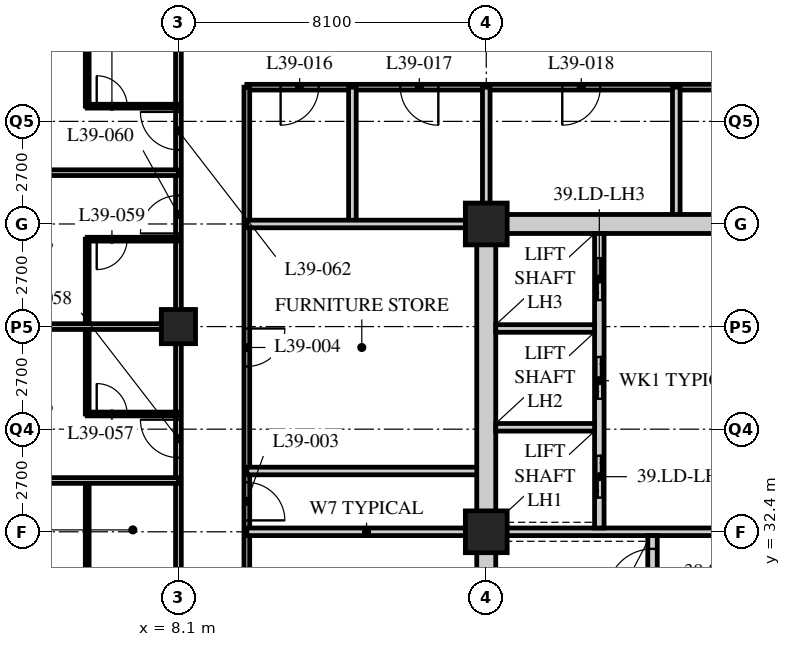
"""IFC4 building model, lengths in metres.
Left out: names, types, materials, properties, quantities, classifications, styles, units other than length and angle.
Written with IfcOpenShell. Run it as: python <this file> out.ifc"""

import sys

from ifc_helpers import new_model, si_unit, direction, frame, frame_2d, origin, origin_2d, place, context, subcontext, project, spatial, rectangle, hollow_rectangle, extrude, element, fill, save


model = new_model("IFC4")
c1 = context("Model", 3, precision=1e-05, world=origin(), true_north=direction((0.0, 1.0)))
c2 = subcontext(c1, "Body", "Model", "MODEL_VIEW")
j1 = project(units=[si_unit("LENGTHUNIT", "METRE"), si_unit("PLANEANGLEUNIT", "RADIAN")], contexts=[c1])
p1 = place(None, origin())
s1 = spatial("IfcSite", under=j1, at=p1, CompositionType="ELEMENT")
p2 = place(p1, origin())
s2 = spatial("IfcBuilding", under=s1, at=p2, CompositionType="ELEMENT")
p3 = place(p2, frame((0.0, 0.0, 151.0)))
s3 = spatial("IfcBuildingStorey", under=s2, at=p3, CompositionType="ELEMENT", Elevation=151.0)
p4 = place(p3, frame((8.1, 37.8, 0.0), z_axis=(0.0, 0.0, 1.0), x_axis=(1.0, 0.0, 0.0)))
e1 = element("IfcColumn", 1, at=p4, inside=s3, PredefinedType="COLUMN", context=c2, shape_type="SweptSolid", body=[
    extrude(hollow_rectangle(XDim=0.9, YDim=0.9, WallThickness=0.1, at=origin_2d()), origin(), (0.0, 0.0, 1.0), 3.4),
])
for number, where, z_axis, x_axis in (
    (2, (16.2, 32.4, 0.0), (0.0, 0.0, 1.0), (1.0, 0.0, 0.0)),
    (3, (16.2, 40.5, 0.0), (0.0, 0.0, 1.0), (1.0, 0.0, 0.0)),
):
    element("IfcColumn", number, at=place(p3, frame(where, z_axis=z_axis, x_axis=x_axis)), inside=s3, PredefinedType="COLUMN", context=c2, shape_type="SweptSolid", body=[
        extrude(hollow_rectangle(XDim=1.1, YDim=1.1, WallThickness=0.1, at=origin_2d()), origin(), (0.0, 0.0, 1.0), 3.4),
    ])
p5 = place(p3, frame((8.1, 17.55, 0.0), z_axis=(0.0, 0.0, 1.0), x_axis=(0.0, 1.0, 0.0)))
e4 = element("IfcWall", 4, at=p5, inside=s3, PredefinedType="PARTITIONING", context=c2, shape_type="SweptSolid", body=[
    extrude(rectangle(XDim=28.35, YDim=0.15, at=frame_2d((14.175, 0.0))), origin(), (0.0, 0.0, 1.0), 2.42),
])
p6 = place(p5, frame((5.95, 0.0, 0.0)))
e5 = element("IfcOpeningElement", 5, at=p6, cuts=e4, PredefinedType="OPENING", context=c2, shape_type="SweptSolid", body=[
    extrude(rectangle(XDim=1.0, YDim=2.1, at=frame_2d((0.5, 1.05))), frame((0.0, 0.085, 0.0), z_axis=(0.0, -1.0, 0.0), x_axis=(1.0, 0.0, 0.0)), (0.0, 0.0, 1.0), 0.17),
])
p7 = place(p5, frame((16.8, 0.0, 0.0)))
e6 = element("IfcOpeningElement", 6, at=p7, cuts=e4, PredefinedType="OPENING", context=c2, shape_type="SweptSolid", body=[
    extrude(rectangle(XDim=1.0, YDim=2.1, at=frame_2d((0.5, 1.05))), frame((0.0, 0.085, 0.0), z_axis=(0.0, -1.0, 0.0), x_axis=(1.0, 0.0, 0.0)), (0.0, 0.0, 1.0), 0.17),
])
p8 = place(p5, frame((22.7, 0.0, 0.0)))
e7 = element("IfcOpeningElement", 7, at=p8, cuts=e4, PredefinedType="OPENING", context=c2, shape_type="SweptSolid", body=[
    extrude(rectangle(XDim=1.0, YDim=2.1, at=frame_2d((0.5, 1.05))), frame((0.0, 0.085, 0.0), z_axis=(0.0, -1.0, 0.0), x_axis=(1.0, 0.0, 0.0)), (0.0, 0.0, 1.0), 0.17),
])
p9 = place(p5, frame((24.9, 0.0, 0.0)))
e8 = element("IfcOpeningElement", 8, at=p9, cuts=e4, PredefinedType="OPENING", context=c2, shape_type="SweptSolid", body=[
    extrude(rectangle(XDim=1.0, YDim=2.1, at=frame_2d((0.5, 1.05))), frame((0.0, 0.085, 0.0), z_axis=(0.0, -1.0, 0.0), x_axis=(1.0, 0.0, 0.0)), (0.0, 0.0, 1.0), 0.17),
])
p10 = place(p3, frame((27.14, 44.1, 0.0), z_axis=(0.0, 0.0, 1.0), x_axis=(-1.0, 0.0, 0.0)))
e9 = element("IfcWall", 9, at=p10, inside=s3, PredefinedType="PARTITIONING", context=c2, shape_type="SweptSolid", body=[
    extrude(rectangle(XDim=17.24, YDim=0.15, at=frame_2d((8.62, 0.0))), origin(), (0.0, 0.0, 1.0), 3.19),
])
p11 = place(p10, frame((15.351, 0.0, 0.0)))
e10 = element("IfcOpeningElement", 10, at=p11, cuts=e9, PredefinedType="OPENING", context=c2, shape_type="SweptSolid", body=[
    extrude(rectangle(XDim=1.0, YDim=2.1, at=frame_2d((0.5, 1.05))), frame((0.0, 0.085, 0.0), z_axis=(0.0, -1.0, 0.0), x_axis=(1.0, 0.0, 0.0)), (0.0, 0.0, 1.0), 0.17),
])
p12 = place(p10, frame((12.201, 0.0, 0.0)))
e11 = element("IfcOpeningElement", 11, at=p12, cuts=e9, PredefinedType="OPENING", context=c2, shape_type="SweptSolid", body=[
    extrude(rectangle(XDim=1.0, YDim=2.1, at=frame_2d((0.5, 1.05))), frame((0.0, 0.085, 0.0), z_axis=(0.0, -1.0, 0.0), x_axis=(1.0, 0.0, 0.0)), (0.0, 0.0, 1.0), 0.17),
])
p13 = place(p10, frame((7.94, 0.0, 0.0)))
e12 = element("IfcOpeningElement", 12, at=p13, cuts=e9, PredefinedType="OPENING", context=c2, shape_type="SweptSolid", body=[
    extrude(rectangle(XDim=1.0, YDim=2.1, at=frame_2d((0.5, 1.05))), frame((0.0, 0.085, 0.0), z_axis=(0.0, -1.0, 0.0), x_axis=(1.0, 0.0, 0.0)), (0.0, 0.0, 1.0), 0.17),
])
p14 = place(p10, frame((2.465, 0.0, 0.0)))
e13 = element("IfcOpeningElement", 13, at=p14, cuts=e9, PredefinedType="OPENING", context=c2, shape_type="SweptSolid", body=[
    extrude(rectangle(XDim=1.0, YDim=2.1, at=frame_2d((0.5, 1.05))), frame((0.0, 0.085, 0.0), z_axis=(0.0, -1.0, 0.0), x_axis=(1.0, 0.0, 0.0)), (0.0, 0.0, 1.0), 0.17),
])
p15 = place(p3, frame((9.9, 44.1, 0.0), z_axis=(0.0, 0.0, 1.0), x_axis=(0.0, -1.0, 0.0)))
e14 = element("IfcWall", 14, at=p15, inside=s3, PredefinedType="PARTITIONING", context=c2, shape_type="SweptSolid", body=[
    extrude(rectangle(XDim=24.75, YDim=0.15, at=frame_2d((12.375, 0.0))), origin(), (0.0, 0.0, 1.0), 3.19),
])
p16 = place(p15, frame((17.871, 0.0, 0.0)))
e15 = element("IfcOpeningElement", 15, at=p16, cuts=e14, PredefinedType="OPENING", context=c2, shape_type="SweptSolid", body=[
    extrude(rectangle(XDim=1.0, YDim=2.1, at=frame_2d((0.5, 1.05))), frame((0.0, 0.085, 0.0), z_axis=(0.0, -1.0, 0.0), x_axis=(1.0, 0.0, 0.0)), (0.0, 0.0, 1.0), 0.17),
])
p17 = place(p15, frame((13.821, 0.0, 0.0)))
e16 = element("IfcOpeningElement", 16, at=p17, cuts=e14, PredefinedType="OPENING", context=c2, shape_type="SweptSolid", body=[
    extrude(rectangle(XDim=1.0, YDim=2.1, at=frame_2d((0.5, 1.05))), frame((0.0, 0.085, 0.0), z_axis=(0.0, -1.0, 0.0), x_axis=(1.0, 0.0, 0.0)), (0.0, 0.0, 1.0), 0.17),
])
p18 = place(p15, frame((10.4, 0.0, 0.0)))
e17 = element("IfcOpeningElement", 17, at=p18, cuts=e14, PredefinedType="OPENING", context=c2, shape_type="SweptSolid", body=[
    extrude(rectangle(XDim=1.0, YDim=2.1, at=frame_2d((0.5, 1.05))), frame((0.0, 0.085, 0.0), z_axis=(0.0, -1.0, 0.0), x_axis=(1.0, 0.0, 0.0)), (0.0, 0.0, 1.0), 0.17),
])
p19 = place(p15, frame((6.35, 0.0, 0.0)))
e18 = element("IfcOpeningElement", 18, at=p19, cuts=e14, PredefinedType="OPENING", context=c2, shape_type="SweptSolid", body=[
    extrude(rectangle(XDim=1.0, YDim=2.1, at=frame_2d((0.5, 1.05))), frame((0.0, 0.085, 0.0), z_axis=(0.0, -1.0, 0.0), x_axis=(1.0, 0.0, 0.0)), (0.0, 0.0, 1.0), 0.17),
])
for number, where, z_axis, x_axis in (
    (19, (9.9, 32.4, 0.0), (0.0, 0.0, 1.0), (1.0, 0.0, 0.0)),
    (20, (9.9, 34.0, 0.0), (0.0, 0.0, 1.0), (1.0, 0.0, 0.0)),
):
    element("IfcWall", number, at=place(p3, frame(where, z_axis=z_axis, x_axis=x_axis)), inside=s3, PredefinedType="SOLIDWALL", context=c2, shape_type="SweptSolid", body=[
        extrude(rectangle(XDim=6.3, YDim=0.2, at=frame_2d((3.15, 0.0))), origin(), (0.0, 0.0, 1.0), 3.19),
    ])
p20 = place(p3, frame((16.2, 40.5, 0.0), z_axis=(0.0, 0.0, 1.0), x_axis=(0.0, 1.0, 0.0)))
e21 = element("IfcWall", 21, at=p20, inside=s3, PredefinedType="SOLIDWALL", context=c2, shape_type="SweptSolid", body=[
    extrude(rectangle(XDim=3.6, YDim=0.2, at=frame_2d((1.8, 0.0))), origin(), (0.0, 0.0, 1.0), 2.42),
])
for number, where, z_axis, x_axis in (
    (22, (12.678, 44.1, 0.0), (0.0, 0.0, 1.0), (0.0, -1.0, 0.0)),
    (23, (21.2, 44.1, 0.0), (0.0, 0.0, 1.0), (0.0, -1.0, 0.0)),
):
    element("IfcWall", number, at=place(p3, frame(where, z_axis=z_axis, x_axis=x_axis)), inside=s3, PredefinedType="SOLIDWALL", context=c2, shape_type="SweptSolid", body=[
        extrude(rectangle(XDim=3.6, YDim=0.2, at=frame_2d((1.8, 0.0))), origin(), (0.0, 0.0, 1.0), 3.19),
    ])
p21 = place(p3, frame((9.9, 40.5, 0.0), z_axis=(0.0, 0.0, 1.0), x_axis=(1.0, 0.0, 0.0)))
e24 = element("IfcWall", 24, at=p21, inside=s3, PredefinedType="SOLIDWALL", context=c2, shape_type="SweptSolid", body=[
    extrude(rectangle(XDim=6.3, YDim=0.2, at=frame_2d((3.15, 0.0))), origin(), (0.0, 0.0, 1.0), 3.19),
])
p22 = place(p3, frame((5.7, 31.15, 0.0), z_axis=(0.0, 0.0, 1.0), x_axis=(0.0, 1.0, 0.0)))
e25 = element("IfcWall", 25, at=p22, inside=s3, PredefinedType="PARTITIONING", context=c2, shape_type="SweptSolid", body=[
    extrude(rectangle(XDim=2.6, YDim=0.1, at=frame_2d((1.3, 0.0))), origin(), (0.0, 0.0, 1.0), 3.19),
])
p23 = place(p3, frame((8.1, 33.75, 0.0), z_axis=(0.0, 0.0, 1.0), x_axis=(-1.0, 0.0, 0.0)))
e26 = element("IfcWall", 26, at=p23, inside=s3, PredefinedType="PARTITIONING", context=c2, shape_type="SweptSolid", body=[
    extrude(rectangle(XDim=7.8, YDim=0.15, at=frame_2d((3.9, 0.0))), origin(), (0.0, 0.0, 1.0), 3.19),
])
p24 = place(p3, frame((5.7, 35.5, 0.0), z_axis=(0.0, 0.0, 1.0), x_axis=(0.0, 1.0, 0.0)))
e27 = element("IfcWall", 27, at=p24, inside=s3, PredefinedType="PARTITIONING", context=c2, shape_type="SweptSolid", body=[
    extrude(rectangle(XDim=4.6, YDim=0.1, at=frame_2d((2.3, 0.0))), origin(), (0.0, 0.0, 1.0), 3.19),
])
p25 = place(p3, frame((8.1, 35.5, 0.0), z_axis=(0.0, 0.0, 1.0), x_axis=(-1.0, 0.0, 0.0)))
e28 = element("IfcWall", 28, at=p25, inside=s3, PredefinedType="PARTITIONING", context=c2, shape_type="SweptSolid", body=[
    extrude(rectangle(XDim=2.4, YDim=0.1, at=frame_2d((1.2, 0.0))), origin(), (0.0, 0.0, 1.0), 3.19),
])
p26 = place(p25, frame((1.35, 0.0, 0.0)))
e29 = element("IfcOpeningElement", 29, at=p26, cuts=e28, PredefinedType="OPENING", context=c2, shape_type="SweptSolid", body=[
    extrude(rectangle(XDim=0.8, YDim=2.1, at=frame_2d((0.4, 1.05))), frame((0.0, 0.06, 0.0), z_axis=(0.0, -1.0, 0.0), x_axis=(1.0, 0.0, 0.0)), (0.0, 0.0, 1.0), 0.12),
])
p27 = place(p3, frame((8.1, 37.8, 0.0), z_axis=(0.0, 0.0, 1.0), x_axis=(-1.0, 0.0, 0.0)))
e30 = element("IfcWall", 30, at=p27, inside=s3, PredefinedType="PARTITIONING", context=c2, shape_type="SweptSolid", body=[
    extrude(rectangle(XDim=7.8, YDim=0.15, at=frame_2d((3.9, 0.0))), origin(), (0.0, 0.0, 1.0), 2.42),
])
p28 = place(p3, frame((8.1, 40.1, 0.0), z_axis=(0.0, 0.0, 1.0), x_axis=(-1.0, 0.0, 0.0)))
e31 = element("IfcWall", 31, at=p28, inside=s3, PredefinedType="PARTITIONING", context=c2, shape_type="SweptSolid", body=[
    extrude(rectangle(XDim=2.4, YDim=0.1, at=frame_2d((1.2, 0.0))), origin(), (0.0, 0.0, 1.0), 3.19),
])
p29 = place(p28, frame((1.35, 0.0, 0.0)))
e32 = element("IfcOpeningElement", 32, at=p29, cuts=e31, PredefinedType="OPENING", context=c2, shape_type="SweptSolid", body=[
    extrude(rectangle(XDim=0.8, YDim=2.1, at=frame_2d((0.4, 1.05))), frame((0.0, 0.06, 0.0), z_axis=(0.0, -1.0, 0.0), x_axis=(1.0, 0.0, 0.0)), (0.0, 0.0, 1.0), 0.12),
])
p30 = place(p3, frame((8.1, 41.85, 0.0), z_axis=(0.0, 0.0, 1.0), x_axis=(-1.0, 0.0, 0.0)))
e33 = element("IfcWall", 33, at=p30, inside=s3, PredefinedType="PARTITIONING", context=c2, shape_type="SweptSolid", body=[
    extrude(rectangle(XDim=7.8, YDim=0.15, at=frame_2d((3.9, 0.0))), origin(), (0.0, 0.0, 1.0), 3.19),
])
p31 = place(p3, frame((5.7, 43.6, 0.0), z_axis=(0.0, 0.0, 1.0), x_axis=(0.0, 1.0, 0.0)))
e34 = element("IfcWall", 34, at=p31, inside=s3, PredefinedType="PARTITIONING", context=c2, shape_type="SweptSolid", body=[
    extrude(rectangle(XDim=2.3, YDim=0.1, at=frame_2d((1.15, 0.0))), origin(), (0.0, 0.0, 1.0), 3.19),
])
p32 = place(p3, frame((8.1, 43.6, 0.0), z_axis=(0.0, 0.0, 1.0), x_axis=(-1.0, 0.0, 0.0)))
e35 = element("IfcWall", 35, at=p32, inside=s3, PredefinedType="PARTITIONING", context=c2, shape_type="SweptSolid", body=[
    extrude(rectangle(XDim=2.4, YDim=0.1, at=frame_2d((1.2, 0.0))), origin(), (0.0, 0.0, 1.0), 3.19),
])
p33 = place(p32, frame((1.35, 0.0, 0.0)))
e36 = element("IfcOpeningElement", 36, at=p33, cuts=e35, PredefinedType="OPENING", context=c2, shape_type="SweptSolid", body=[
    extrude(rectangle(XDim=0.8, YDim=2.1, at=frame_2d((0.4, 1.05))), frame((0.0, 0.06, 0.0), z_axis=(0.0, -1.0, 0.0), x_axis=(1.0, 0.0, 0.0)), (0.0, 0.0, 1.0), 0.12),
])
p34 = place(p3, frame((15.95, 40.5, 0.0), z_axis=(0.0, 0.0, 1.0), x_axis=(1.0, 0.0, 0.0)))
e37 = element("IfcWall", 37, at=p34, inside=s3, PredefinedType="SOLIDWALL", context=c2, shape_type="SweptSolid", body=[
    extrude(rectangle(XDim=24.8, YDim=0.5, at=frame_2d((12.4, 0.0))), origin(), (0.0, 0.0, 1.0), 2.42),
])
p35 = place(p34, frame((11.5, 0.0, 0.0)))
e38 = element("IfcOpeningElement", 38, at=p35, cuts=e37, PredefinedType="OPENING", context=c2, shape_type="SweptSolid", body=[
    extrude(rectangle(XDim=1.8, YDim=2.4, at=frame_2d((0.9, 1.2))), frame((0.0, 0.26, 0.0), z_axis=(0.0, -1.0, 0.0), x_axis=(1.0, 0.0, 0.0)), (0.0, 0.0, 1.0), 0.52),
])
p36 = place(p3, frame((16.2, 24.55, 0.0), z_axis=(0.0, 0.0, 1.0), x_axis=(0.0, 1.0, 0.0)))
e39 = element("IfcWall", 39, at=p36, inside=s3, PredefinedType="SOLIDWALL", context=c2, shape_type="SweptSolid", body=[
    extrude(rectangle(XDim=15.7, YDim=0.5, at=frame_2d((7.85, 0.0))), origin(), (0.0, 0.0, 1.0), 2.42),
])
p37 = place(p3, frame((16.45, 32.4, 0.0), z_axis=(0.0, 0.0, 1.0), x_axis=(1.0, 0.0, 0.0)))
e40 = element("IfcWall", 40, at=p37, inside=s3, PredefinedType="SOLIDWALL", context=c2, shape_type="SweptSolid", body=[
    extrude(rectangle(XDim=7.95, YDim=0.2, at=frame_2d((3.975, 0.0))), origin(), (0.0, 0.0, 1.0), 2.578),
])
p38 = place(p3, frame((20.575, 24.55, 0.0), z_axis=(0.0, 0.0, 1.0), x_axis=(0.0, 1.0, 0.0)))
e41 = element("IfcWall", 41, at=p38, inside=s3, PredefinedType="SOLIDWALL", context=c2, shape_type="SweptSolid", body=[
    extrude(rectangle(XDim=7.75, YDim=0.25, at=frame_2d((3.875, 0.0))), origin(), (0.0, 0.0, 1.0), 3.19),
])
p39 = place(p38, frame((6.2, 0.0, 0.0)))
e42 = element("IfcOpeningElement", 42, at=p39, cuts=e41, PredefinedType="OPENING", context=c2, shape_type="SweptSolid", body=[
    extrude(rectangle(XDim=1.2, YDim=2.1, at=frame_2d((0.6, 1.05))), frame((0.0, 0.135, 0.0), z_axis=(0.0, -1.0, 0.0), x_axis=(1.0, 0.0, 0.0)), (0.0, 0.0, 1.0), 0.27),
])
p40 = place(p3, frame((19.175, 32.5, 0.0), z_axis=(0.0, 0.0, 1.0), x_axis=(0.0, 1.0, 0.0)))
e43 = element("IfcWall", 43, at=p40, inside=s3, PredefinedType="SOLIDWALL", context=c2, shape_type="SweptSolid", body=[
    extrude(rectangle(XDim=7.75, YDim=0.25, at=frame_2d((3.875, 0.0))), origin(), (0.0, 0.0, 1.0), 3.19),
])
p41 = place(p40, frame((0.8, 0.0, 0.0)))
e44 = element("IfcOpeningElement", 44, at=p41, cuts=e43, PredefinedType="OPENING", context=c2, shape_type="SweptSolid", body=[
    extrude(rectangle(XDim=1.1, YDim=2.4, at=frame_2d((0.55, 1.2))), frame((0.0, 0.135, 0.0), z_axis=(0.0, -1.0, 0.0), x_axis=(1.0, 0.0, 0.0)), (0.0, 0.0, 1.0), 0.27),
])
p42 = place(p40, frame((3.4, 0.0, 0.0)))
e45 = element("IfcOpeningElement", 45, at=p42, cuts=e43, PredefinedType="OPENING", context=c2, shape_type="SweptSolid", body=[
    extrude(rectangle(XDim=1.1, YDim=2.4, at=frame_2d((0.55, 1.2))), frame((0.0, 0.135, 0.0), z_axis=(0.0, -1.0, 0.0), x_axis=(1.0, 0.0, 0.0)), (0.0, 0.0, 1.0), 0.27),
])
p43 = place(p40, frame((6.0, 0.0, 0.0)))
e46 = element("IfcOpeningElement", 46, at=p43, cuts=e43, PredefinedType="OPENING", context=c2, shape_type="SweptSolid", body=[
    extrude(rectangle(XDim=1.1, YDim=2.4, at=frame_2d((0.55, 1.2))), frame((0.0, 0.135, 0.0), z_axis=(0.0, -1.0, 0.0), x_axis=(1.0, 0.0, 0.0)), (0.0, 0.0, 1.0), 0.27),
])
for number, where, z_axis, x_axis in (
    (47, (16.45, 35.15, 0.0), (0.0, 0.0, 1.0), (1.0, 0.0, 0.0)),
    (48, (16.45, 37.75, 0.0), (0.0, 0.0, 1.0), (1.0, 0.0, 0.0)),
):
    element("IfcWall", number, at=place(p3, frame(where, z_axis=z_axis, x_axis=x_axis)), inside=s3, PredefinedType="SOLIDWALL", context=c2, shape_type="SweptSolid", body=[
        extrude(rectangle(XDim=2.6, YDim=0.2, at=frame_2d((1.3, 0.0))), origin(), (0.0, 0.0, 1.0), 3.19),
    ])
p44 = place(p18, origin())
e49 = element("IfcDoor", 49, at=p44, inside=s3, OperationType="SINGLE_SWING_RIGHT", PredefinedType="DOOR", context=c2, shape_type="SweptSolid", body=[
    extrude(rectangle(XDim=1.0, YDim=2.1, at=frame_2d((0.5, 1.05))), frame((0.0, 0.025, 0.0), z_axis=(0.0, -1.0, 0.0), x_axis=(1.0, 0.0, 0.0)), (0.0, 0.0, 1.0), 0.05),
])
fill(e17, e49)
p45 = place(p19, origin())
e50 = element("IfcDoor", 50, at=p45, inside=s3, OperationType="SINGLE_SWING_LEFT", PredefinedType="DOOR", context=c2, shape_type="SweptSolid", body=[
    extrude(rectangle(XDim=1.0, YDim=2.1, at=frame_2d((0.5, 1.05))), frame((0.0, 0.025, 0.0), z_axis=(0.0, -1.0, 0.0), x_axis=(1.0, 0.0, 0.0)), (0.0, 0.0, 1.0), 0.05),
])
fill(e18, e50)
p46 = place(p11, origin())
e51 = element("IfcDoor", 51, at=p46, inside=s3, OperationType="SINGLE_SWING_RIGHT", PredefinedType="DOOR", context=c2, shape_type="SweptSolid", body=[
    extrude(rectangle(XDim=1.0, YDim=2.1, at=frame_2d((0.5, 1.05))), frame((0.0, 0.025, 0.0), z_axis=(0.0, -1.0, 0.0), x_axis=(1.0, 0.0, 0.0)), (0.0, 0.0, 1.0), 0.05),
])
fill(e10, e51)
p47 = place(p12, origin())
e52 = element("IfcDoor", 52, at=p47, inside=s3, OperationType="SINGLE_SWING_LEFT", PredefinedType="DOOR", context=c2, shape_type="SweptSolid", body=[
    extrude(rectangle(XDim=1.0, YDim=2.1, at=frame_2d((0.5, 1.05))), frame((0.0, 0.025, 0.0), z_axis=(0.0, -1.0, 0.0), x_axis=(1.0, 0.0, 0.0)), (0.0, 0.0, 1.0), 0.05),
])
fill(e11, e52)
p48 = place(p13, origin())
e53 = element("IfcDoor", 53, at=p48, inside=s3, OperationType="SINGLE_SWING_RIGHT", PredefinedType="DOOR", context=c2, shape_type="SweptSolid", body=[
    extrude(rectangle(XDim=1.0, YDim=2.1, at=frame_2d((0.5, 1.05))), frame((0.0, 0.025, 0.0), z_axis=(0.0, -1.0, 0.0), x_axis=(1.0, 0.0, 0.0)), (0.0, 0.0, 1.0), 0.05),
])
fill(e12, e53)
p49 = place(p26, origin())
e54 = element("IfcDoor", 54, at=p49, inside=s3, OperationType="SINGLE_SWING_LEFT", PredefinedType="DOOR", context=c2, shape_type="SweptSolid", body=[
    extrude(rectangle(XDim=0.8, YDim=2.1, at=frame_2d((0.4, 1.05))), frame((0.0, 0.025, 0.0), z_axis=(0.0, -1.0, 0.0), x_axis=(1.0, 0.0, 0.0)), (0.0, 0.0, 1.0), 0.05),
])
fill(e29, e54)
p50 = place(p7, origin())
e55 = element("IfcDoor", 55, at=p50, inside=s3, OperationType="SINGLE_SWING_RIGHT", PredefinedType="DOOR", context=c2, shape_type="SweptSolid", body=[
    extrude(rectangle(XDim=1.0, YDim=2.1, at=frame_2d((0.5, 1.05))), frame((0.0, 0.025, 0.0), z_axis=(0.0, -1.0, 0.0), x_axis=(1.0, 0.0, 0.0)), (0.0, 0.0, 1.0), 0.05),
])
fill(e6, e55)
p51 = place(p29, origin())
e56 = element("IfcDoor", 56, at=p51, inside=s3, OperationType="SINGLE_SWING_RIGHT", PredefinedType="DOOR", context=c2, shape_type="SweptSolid", body=[
    extrude(rectangle(XDim=0.8, YDim=2.1, at=frame_2d((0.4, 1.05))), frame((0.0, 0.025, 0.0), z_axis=(0.0, -1.0, 0.0), x_axis=(1.0, 0.0, 0.0)), (0.0, 0.0, 1.0), 0.05),
])
fill(e32, e56)
p52 = place(p8, origin())
e57 = element("IfcDoor", 57, at=p52, inside=s3, OperationType="SINGLE_SWING_LEFT", PredefinedType="DOOR", context=c2, shape_type="SweptSolid", body=[
    extrude(rectangle(XDim=1.0, YDim=2.1, at=frame_2d((0.5, 1.05))), frame((0.0, 0.025, 0.0), z_axis=(0.0, -1.0, 0.0), x_axis=(1.0, 0.0, 0.0)), (0.0, 0.0, 1.0), 0.05),
])
fill(e7, e57)
p53 = place(p33, origin())
e58 = element("IfcDoor", 58, at=p53, inside=s3, OperationType="SINGLE_SWING_LEFT", PredefinedType="DOOR", context=c2, shape_type="SweptSolid", body=[
    extrude(rectangle(XDim=0.8, YDim=2.1, at=frame_2d((0.4, 1.05))), frame((0.0, 0.025, 0.0), z_axis=(0.0, -1.0, 0.0), x_axis=(1.0, 0.0, 0.0)), (0.0, 0.0, 1.0), 0.05),
])
fill(e36, e58)
p54 = place(p9, origin())
e59 = element("IfcDoor", 59, at=p54, inside=s3, OperationType="SINGLE_SWING_RIGHT", PredefinedType="DOOR", context=c2, shape_type="SweptSolid", body=[
    extrude(rectangle(XDim=1.0, YDim=2.1, at=frame_2d((0.5, 1.05))), frame((0.0, 0.025, 0.0), z_axis=(0.0, -1.0, 0.0), x_axis=(1.0, 0.0, 0.0)), (0.0, 0.0, 1.0), 0.05),
])
fill(e8, e59)
p55 = place(p39, origin())
e60 = element("IfcDoor", 60, at=p55, inside=s3, OperationType="SINGLE_SWING_LEFT", PredefinedType="DOOR", context=c2, shape_type="SweptSolid", body=[
    extrude(rectangle(XDim=1.2, YDim=2.1, at=frame_2d((0.6, 1.05))), frame((0.0, 0.025, 0.0), z_axis=(0.0, -1.0, 0.0), x_axis=(1.0, 0.0, 0.0)), (0.0, 0.0, 1.0), 0.05),
])
fill(e42, e60)
p56 = place(p41, origin())
e61 = element("IfcDoor", 61, at=p56, inside=s3, OperationType="DOUBLE_DOOR_SLIDING", PredefinedType="DOOR", context=c2, shape_type="SweptSolid", body=[
    extrude(rectangle(XDim=1.1, YDim=2.4, at=frame_2d((0.55, 1.2))), frame((0.0, 0.025, 0.0), z_axis=(0.0, -1.0, 0.0), x_axis=(1.0, 0.0, 0.0)), (0.0, 0.0, 1.0), 0.05),
])
fill(e44, e61)
p57 = place(p42, origin())
e62 = element("IfcDoor", 62, at=p57, inside=s3, OperationType="DOUBLE_DOOR_SLIDING", PredefinedType="DOOR", context=c2, shape_type="SweptSolid", body=[
    extrude(rectangle(XDim=1.1, YDim=2.4, at=frame_2d((0.55, 1.2))), frame((0.0, 0.025, 0.0), z_axis=(0.0, -1.0, 0.0), x_axis=(1.0, 0.0, 0.0)), (0.0, 0.0, 1.0), 0.05),
])
fill(e45, e62)
p58 = place(p43, origin())
e63 = element("IfcDoor", 63, at=p58, inside=s3, OperationType="DOUBLE_DOOR_SLIDING", PredefinedType="DOOR", context=c2, shape_type="SweptSolid", body=[
    extrude(rectangle(XDim=1.1, YDim=2.4, at=frame_2d((0.55, 1.2))), frame((0.0, 0.025, 0.0), z_axis=(0.0, -1.0, 0.0), x_axis=(1.0, 0.0, 0.0)), (0.0, 0.0, 1.0), 0.05),
])
fill(e46, e63)
save(model, sys.argv[1])
